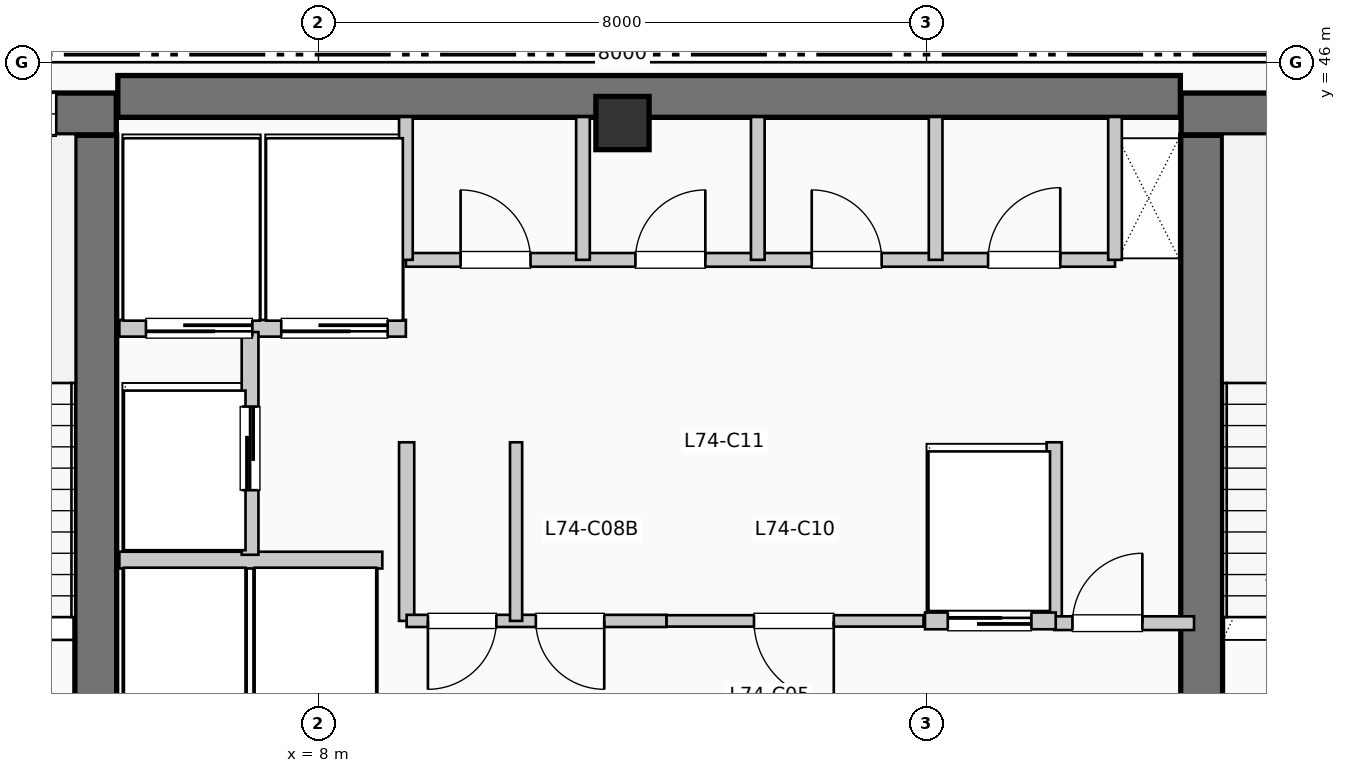
"""IFC4 building model, lengths in metres.
Left out: names, types, materials, properties, quantities, classifications, styles, units other than length and angle.
Written with IfcOpenShell. Run it as: python <this file> out.ifc"""

import sys

from ifc_helpers import new_model, si_unit, direction, frame, frame_2d, origin, origin_2d, place, context, subcontext, project, spatial, rectangle, extrude, element, fill, save


model = new_model("IFC4")
c1 = context("Model", 3, precision=1e-05, world=origin(), true_north=direction((0.0, 1.0)))
c2 = subcontext(c1, "Body", "Model", "MODEL_VIEW")
j1 = project(units=[si_unit("LENGTHUNIT", "METRE"), si_unit("PLANEANGLEUNIT", "RADIAN")], contexts=[c1])
p1 = place(None, origin())
s1 = spatial("IfcSite", under=j1, at=p1, CompositionType="ELEMENT")
p2 = place(p1, origin())
s2 = spatial("IfcBuilding", under=s1, at=p2, CompositionType="ELEMENT")
p3 = place(p2, frame((0.0, 0.0, 303.93)))
s3 = spatial("IfcBuildingStorey", under=s2, at=p3, CompositionType="ELEMENT", Elevation=303.93)
p4 = place(p3, frame((5.36, 45.55, 0.0), z_axis=(0.0, 0.0, 1.0), x_axis=(1.0, 0.0, 0.0)))
e1 = element("IfcWall", 1, at=p4, inside=s3, PredefinedType="SHEAR", context=c2, shape_type="SweptSolid", body=[
    extrude(rectangle(XDim=13.98, YDim=0.55, at=frame_2d((6.99, 0.0))), origin(), (0.0, 0.0, 1.0), 3.96),
])
p5 = place(p3, frame((5.07, 37.15, 0.0), z_axis=(0.0, 0.0, 1.0), x_axis=(0.0, 1.0, 0.0)))
e2 = element("IfcWall", 2, at=p5, inside=s3, PredefinedType="SHEAR", context=c2, shape_type="SweptSolid", body=[
    extrude(rectangle(XDim=7.89, YDim=0.55, at=frame_2d((3.945, 0.0))), origin(), (0.0, 0.0, 1.0), 3.96),
])
p6 = place(p3, frame((1.1, 45.32, 0.0), z_axis=(0.0, 0.0, 1.0), x_axis=(1.0, 0.0, 0.0)))
e3 = element("IfcWall", 3, at=p6, inside=s3, PredefinedType="SHEAR", context=c2, shape_type="SweptSolid", body=[
    extrude(rectangle(XDim=4.24, YDim=0.55, at=frame_2d((2.12, 0.0))), origin(), (0.0, 0.0, 1.0), 3.96),
])
p7 = place(p6, frame((2.05, 0.0, 1.05)))
e4 = element("IfcOpeningElement", 4, at=p7, cuts=e3, PredefinedType="OPENING", context=c2, shape_type="SweptSolid", body=[
    extrude(rectangle(XDim=1.4, YDim=1.8, at=frame_2d((0.7, 0.9))), frame((0.0, 0.285, 0.0), z_axis=(0.0, -1.0, 0.0), x_axis=(1.0, 0.0, 0.0)), (0.0, 0.0, 1.0), 0.57),
])
p8 = place(p3, frame((19.62, 37.15, 0.0), z_axis=(0.0, 0.0, 1.0), x_axis=(0.0, 1.0, 0.0)))
e5 = element("IfcWall", 5, at=p8, inside=s3, PredefinedType="SHEAR", context=c2, shape_type="SweptSolid", body=[
    extrude(rectangle(XDim=7.89, YDim=0.55, at=frame_2d((3.945, 0.0))), origin(), (0.0, 0.0, 1.0), 3.96),
])
p9 = place(p3, frame((19.35, 45.32, 0.0), z_axis=(0.0, 0.0, 1.0), x_axis=(1.0, 0.0, 0.0)))
e6 = element("IfcWall", 6, at=p9, inside=s3, PredefinedType="SHEAR", context=c2, shape_type="SweptSolid", body=[
    extrude(rectangle(XDim=3.69, YDim=0.55, at=frame_2d((1.845, 0.0))), origin(), (0.0, 0.0, 1.0), 3.96),
])
p10 = place(p9, frame((1.15, 0.0, 1.05)))
e7 = element("IfcOpeningElement", 7, at=p10, cuts=e6, PredefinedType="OPENING", context=c2, shape_type="SweptSolid", body=[
    extrude(rectangle(XDim=1.4, YDim=1.8, at=frame_2d((0.7, 0.9))), frame((0.0, 0.285, 0.0), z_axis=(0.0, -1.0, 0.0), x_axis=(1.0, 0.0, 0.0)), (0.0, 0.0, 1.0), 0.57),
])
p11 = place(p3, frame((12.0, 45.2, 0.0), z_axis=(0.0, 0.0, 1.0), x_axis=(1.0, 0.0, 0.0)))
e8 = element("IfcColumn", 8, at=p11, inside=s3, PredefinedType="COLUMN", context=c2, shape_type="SweptSolid", body=[
    extrude(rectangle(XDim=0.7, YDim=0.7, at=origin_2d()), origin(), (0.0, 0.0, 1.0), 3.96),
])
p12 = place(p3, frame((5.38, 39.45, 0.0), z_axis=(0.0, 0.0, 1.0), x_axis=(1.0, 0.0, 0.0)))
e9 = element("IfcWall", 9, at=p12, inside=s3, PredefinedType="PARTITIONING", context=c2, shape_type="SweptSolid", body=[
    extrude(rectangle(XDim=3.46, YDim=0.22, at=frame_2d((1.73, 0.0))), origin(), (0.0, 0.0, 1.0), 3.74),
])
p13 = place(p3, frame((5.38, 42.5, 0.0), z_axis=(0.0, 0.0, 1.0), x_axis=(1.0, 0.0, 0.0)))
e10 = element("IfcWall", 10, at=p13, inside=s3, PredefinedType="PARTITIONING", context=c2, shape_type="SweptSolid", body=[
    extrude(rectangle(XDim=3.77, YDim=0.22, at=frame_2d((1.885, 0.0))), origin(), (0.0, 0.0, 1.0), 3.74),
])
p14 = place(p13, frame((1.75, 0.0, 0.0), z_axis=(0.0, 0.0, 1.0), x_axis=(-1.0, 0.0, 0.0)))
e11 = element("IfcOpeningElement", 11, at=p14, cuts=e10, PredefinedType="OPENING", context=c2, shape_type="SweptSolid", body=[
    extrude(rectangle(XDim=1.4, YDim=2.2, at=frame_2d((0.7, 1.1))), frame((0.0, 0.12, 0.0), z_axis=(0.0, -1.0, 0.0), x_axis=(1.0, 0.0, 0.0)), (0.0, 0.0, 1.0), 0.24),
])
p15 = place(p13, frame((3.53, 0.0, 0.0), z_axis=(0.0, 0.0, 1.0), x_axis=(-1.0, 0.0, 0.0)))
e12 = element("IfcOpeningElement", 12, at=p15, cuts=e10, PredefinedType="OPENING", context=c2, shape_type="SweptSolid", body=[
    extrude(rectangle(XDim=1.4, YDim=2.2, at=frame_2d((0.7, 1.1))), frame((0.0, 0.12, 0.0), z_axis=(0.0, -1.0, 0.0), x_axis=(1.0, 0.0, 0.0)), (0.0, 0.0, 1.0), 0.24),
])
p16 = place(p3, frame((7.1, 39.52, 0.0), z_axis=(0.0, 0.0, 1.0), x_axis=(0.0, 1.0, 0.0)))
e13 = element("IfcWall", 13, at=p16, inside=s3, PredefinedType="PARTITIONING", context=c2, shape_type="SweptSolid", body=[
    extrude(rectangle(XDim=2.93, YDim=0.22, at=frame_2d((1.465, 0.0))), origin(), (0.0, 0.0, 1.0), 3.74),
])
p17 = place(p16, frame((0.85, 0.0, 0.0)))
e14 = element("IfcOpeningElement", 14, at=p17, cuts=e13, PredefinedType="OPENING", context=c2, shape_type="SweptSolid", body=[
    extrude(rectangle(XDim=1.1, YDim=2.2, at=frame_2d((0.55, 1.1))), frame((0.0, 0.12, 0.0), z_axis=(0.0, -1.0, 0.0), x_axis=(1.0, 0.0, 0.0)), (0.0, 0.0, 1.0), 0.24),
])
for number, where, z_axis, x_axis in (
    (15, (9.16, 38.65, 0.0), (0.0, 0.0, 1.0), (0.0, 1.0, 0.0)),
    (16, (17.68, 38.65, 0.0), (0.0, 0.0, 1.0), (0.0, 1.0, 0.0)),
):
    element("IfcWall", number, at=place(p3, frame(where, z_axis=z_axis, x_axis=x_axis)), inside=s3, PredefinedType="PARTITIONING", context=c2, shape_type="SweptSolid", body=[
        extrude(rectangle(XDim=2.35, YDim=0.2, at=frame_2d((1.175, 0.0))), origin(), (0.0, 0.0, 1.0), 3.74),
    ])
p18 = place(p3, frame((17.68, 38.62, 0.0), z_axis=(0.0, 0.0, 1.0), x_axis=(1.0, 0.0, 0.0)))
e17 = element("IfcWall", 17, at=p18, inside=s3, PredefinedType="PARTITIONING", context=c2, shape_type="SweptSolid", body=[
    extrude(rectangle(XDim=1.84, YDim=0.18, at=frame_2d((0.92, 0.0))), origin(), (0.0, 0.0, 1.0), 3.74),
])
p19 = place(p18, frame((0.24, 0.0, 0.0)))
e18 = element("IfcOpeningElement", 18, at=p19, cuts=e17, PredefinedType="OPENING", context=c2, shape_type="SweptSolid", body=[
    extrude(rectangle(XDim=0.92, YDim=2.1, at=frame_2d((0.46, 1.05))), frame((0.0, 0.1, 0.0), z_axis=(0.0, -1.0, 0.0), x_axis=(1.0, 0.0, 0.0)), (0.0, 0.0, 1.0), 0.2),
])
p20 = place(p3, frame((9.16, 38.65, 0.0), z_axis=(0.0, 0.0, 1.0), x_axis=(1.0, 0.0, 0.0)))
e19 = element("IfcWall", 19, at=p20, inside=s3, PredefinedType="PARTITIONING", context=c2, shape_type="SweptSolid", body=[
    extrude(rectangle(XDim=3.42, YDim=0.16, at=frame_2d((1.71, 0.0))), origin(), (0.0, 0.0, 1.0), 3.74),
])
p21 = place(p20, frame((1.18, 0.0, 0.0), z_axis=(0.0, 0.0, 1.0), x_axis=(-1.0, 0.0, 0.0)))
e20 = element("IfcOpeningElement", 20, at=p21, cuts=e19, PredefinedType="OPENING", context=c2, shape_type="SweptSolid", body=[
    extrude(rectangle(XDim=0.9, YDim=2.15, at=frame_2d((0.45, 1.075))), frame((0.0, 0.09, 0.0), z_axis=(0.0, -1.0, 0.0), x_axis=(1.0, 0.0, 0.0)), (0.0, 0.0, 1.0), 0.18),
])
p22 = place(p20, frame((2.6, 0.0, 0.0), z_axis=(0.0, 0.0, 1.0), x_axis=(-1.0, 0.0, 0.0)))
e21 = element("IfcOpeningElement", 21, at=p22, cuts=e19, PredefinedType="OPENING", context=c2, shape_type="SweptSolid", body=[
    extrude(rectangle(XDim=0.9, YDim=2.15, at=frame_2d((0.45, 1.075))), frame((0.0, 0.09, 0.0), z_axis=(0.0, -1.0, 0.0), x_axis=(1.0, 0.0, 0.0)), (0.0, 0.0, 1.0), 0.18),
])
p23 = place(p3, frame((10.6, 38.65, 0.0), z_axis=(0.0, 0.0, 1.0), x_axis=(0.0, 1.0, 0.0)))
e22 = element("IfcWall", 22, at=p23, inside=s3, PredefinedType="PARTITIONING", context=c2, shape_type="SweptSolid", body=[
    extrude(rectangle(XDim=2.35, YDim=0.16, at=frame_2d((1.175, 0.0))), origin(), (0.0, 0.0, 1.0), 3.74),
])
p24 = place(p3, frame((12.58, 38.65, 0.0), z_axis=(0.0, 0.0, 1.0), x_axis=(1.0, 0.0, 0.0)))
e23 = element("IfcWall", 23, at=p24, inside=s3, PredefinedType="PARTITIONING", context=c2, shape_type="SweptSolid", body=[
    extrude(rectangle(XDim=3.38, YDim=0.15, at=frame_2d((1.69, 0.0))), origin(), (0.0, 0.0, 1.0), 3.74),
])
p25 = place(p24, frame((2.2, 0.0, 0.0), z_axis=(0.0, 0.0, 1.0), x_axis=(-1.0, 0.0, 0.0)))
e24 = element("IfcOpeningElement", 24, at=p25, cuts=e23, PredefinedType="OPENING", context=c2, shape_type="SweptSolid", body=[
    extrude(rectangle(XDim=1.05, YDim=2.15, at=frame_2d((0.525, 1.075))), frame((0.0, 0.085, 0.0), z_axis=(0.0, -1.0, 0.0), x_axis=(1.0, 0.0, 0.0)), (0.0, 0.0, 1.0), 0.17),
])
p26 = place(p3, frame((15.98, 38.65, 0.0), z_axis=(0.0, 0.0, 1.0), x_axis=(1.0, 0.0, 0.0)))
e25 = element("IfcWall", 25, at=p26, inside=s3, PredefinedType="PARTITIONING", context=c2, shape_type="SweptSolid", body=[
    extrude(rectangle(XDim=1.72, YDim=0.22, at=frame_2d((0.86, 0.0))), origin(), (0.0, 0.0, 1.0), 3.74),
])
p27 = place(p26, frame((0.3, 0.0, 0.0)))
e26 = element("IfcOpeningElement", 26, at=p27, cuts=e25, PredefinedType="OPENING", context=c2, shape_type="SweptSolid", body=[
    extrude(rectangle(XDim=1.1, YDim=2.2, at=frame_2d((0.55, 1.1))), frame((0.0, 0.12, 0.0), z_axis=(0.0, -1.0, 0.0), x_axis=(1.0, 0.0, 0.0)), (0.0, 0.0, 1.0), 0.24),
])
p28 = place(p3, frame((9.15, 43.4, 0.0), z_axis=(0.0, 0.0, 1.0), x_axis=(1.0, 0.0, 0.0)))
e27 = element("IfcWall", 27, at=p28, inside=s3, PredefinedType="PLUMBINGWALL", context=c2, shape_type="SweptSolid", body=[
    extrude(rectangle(XDim=9.33, YDim=0.18, at=frame_2d((4.665, 0.0))), origin(), (0.0, 0.0, 1.0), 3.74),
])
p29 = place(p28, frame((0.72, 0.0, 0.0)))
e28 = element("IfcOpeningElement", 28, at=p29, cuts=e27, PredefinedType="OPENING", context=c2, shape_type="SweptSolid", body=[
    extrude(rectangle(XDim=0.92, YDim=2.1, at=frame_2d((0.46, 1.05))), frame((0.0, 0.1, 0.0), z_axis=(0.0, -1.0, 0.0), x_axis=(1.0, 0.0, 0.0)), (0.0, 0.0, 1.0), 0.2),
])
p30 = place(p28, frame((3.02, 0.0, 0.0)))
e29 = element("IfcOpeningElement", 29, at=p30, cuts=e27, PredefinedType="OPENING", context=c2, shape_type="SweptSolid", body=[
    extrude(rectangle(XDim=0.92, YDim=2.1, at=frame_2d((0.46, 1.05))), frame((0.0, 0.1, 0.0), z_axis=(0.0, -1.0, 0.0), x_axis=(1.0, 0.0, 0.0)), (0.0, 0.0, 1.0), 0.2),
])
p31 = place(p28, frame((5.34, 0.0, 0.0)))
e30 = element("IfcOpeningElement", 30, at=p31, cuts=e27, PredefinedType="OPENING", context=c2, shape_type="SweptSolid", body=[
    extrude(rectangle(XDim=0.92, YDim=2.1, at=frame_2d((0.46, 1.05))), frame((0.0, 0.1, 0.0), z_axis=(0.0, -1.0, 0.0), x_axis=(1.0, 0.0, 0.0)), (0.0, 0.0, 1.0), 0.2),
])
p32 = place(p28, frame((7.66, 0.0, 0.0)))
e31 = element("IfcOpeningElement", 31, at=p32, cuts=e27, PredefinedType="OPENING", context=c2, shape_type="SweptSolid", body=[
    extrude(rectangle(XDim=0.95, YDim=2.1, at=frame_2d((0.475, 1.05))), frame((0.0, 0.1, 0.0), z_axis=(0.0, -1.0, 0.0), x_axis=(1.0, 0.0, 0.0)), (0.0, 0.0, 1.0), 0.2),
])
for number, where, z_axis, x_axis in (
    (32, (9.15, 43.4, 0.0), (0.0, 0.0, 1.0), (0.0, 1.0, 0.0)),
    (33, (18.48, 43.4, 0.0), (0.0, 0.0, 1.0), (0.0, 1.0, 0.0)),
    (34, (11.48, 43.4, 0.0), (0.0, 0.0, 1.0), (0.0, 1.0, 0.0)),
    (35, (13.78, 43.4, 0.0), (0.0, 0.0, 1.0), (0.0, 1.0, 0.0)),
    (36, (16.12, 43.4, 0.0), (0.0, 0.0, 1.0), (0.0, 1.0, 0.0)),
):
    element("IfcWall", number, at=place(p3, frame(where, z_axis=z_axis, x_axis=x_axis)), inside=s3, PredefinedType="PLUMBINGWALL", context=c2, shape_type="SweptSolid", body=[
        extrude(rectangle(XDim=1.88, YDim=0.18, at=frame_2d((0.94, 0.0))), origin(), (0.0, 0.0, 1.0), 3.74),
    ])
p33 = place(p7, origin())
e37 = element("IfcWindow", 37, at=p33, inside=s3, PartitioningType="SINGLE_PANEL", PredefinedType="WINDOW", context=c2, shape_type="SweptSolid", body=[
    extrude(rectangle(XDim=1.4, YDim=1.8, at=frame_2d((0.7, 0.9))), frame((0.0, 0.03, 0.0), z_axis=(0.0, -1.0, 0.0), x_axis=(1.0, 0.0, 0.0)), (0.0, 0.0, 1.0), 0.06),
])
fill(e4, e37)
p34 = place(p14, origin())
e38 = element("IfcDoor", 38, at=p34, inside=s3, OperationType="SLIDING_TO_LEFT", PredefinedType="DOOR", context=c2, shape_type="SweptSolid", body=[
    extrude(rectangle(XDim=1.4, YDim=2.2, at=frame_2d((0.7, 1.1))), frame((0.0, 0.025, 0.0), z_axis=(0.0, -1.0, 0.0), x_axis=(1.0, 0.0, 0.0)), (0.0, 0.0, 1.0), 0.05),
])
fill(e11, e38)
p35 = place(p15, origin())
e39 = element("IfcDoor", 39, at=p35, inside=s3, OperationType="SLIDING_TO_LEFT", PredefinedType="DOOR", context=c2, shape_type="SweptSolid", body=[
    extrude(rectangle(XDim=1.4, YDim=2.2, at=frame_2d((0.7, 1.1))), frame((0.0, 0.025, 0.0), z_axis=(0.0, -1.0, 0.0), x_axis=(1.0, 0.0, 0.0)), (0.0, 0.0, 1.0), 0.05),
])
fill(e12, e39)
p36 = place(p17, origin())
e40 = element("IfcDoor", 40, at=p36, inside=s3, OperationType="SLIDING_TO_LEFT", PredefinedType="DOOR", context=c2, shape_type="SweptSolid", body=[
    extrude(rectangle(XDim=1.1, YDim=2.2, at=frame_2d((0.55, 1.1))), frame((0.0, 0.025, 0.0), z_axis=(0.0, -1.0, 0.0), x_axis=(1.0, 0.0, 0.0)), (0.0, 0.0, 1.0), 0.05),
])
fill(e14, e40)
p37 = place(p19, origin())
e41 = element("IfcDoor", 41, at=p37, inside=s3, OperationType="SINGLE_SWING_RIGHT", PredefinedType="DOOR", context=c2, shape_type="SweptSolid", body=[
    extrude(rectangle(XDim=0.92, YDim=2.1, at=frame_2d((0.46, 1.05))), frame((0.0, 0.025, 0.0), z_axis=(0.0, -1.0, 0.0), x_axis=(1.0, 0.0, 0.0)), (0.0, 0.0, 1.0), 0.05),
])
fill(e18, e41)
p38 = place(p21, origin())
e42 = element("IfcDoor", 42, at=p38, inside=s3, OperationType="SINGLE_SWING_LEFT", PredefinedType="DOOR", context=c2, shape_type="SweptSolid", body=[
    extrude(rectangle(XDim=0.9, YDim=2.15, at=frame_2d((0.45, 1.075))), frame((0.0, 0.025, 0.0), z_axis=(0.0, -1.0, 0.0), x_axis=(1.0, 0.0, 0.0)), (0.0, 0.0, 1.0), 0.05),
])
fill(e20, e42)
p39 = place(p22, origin())
e43 = element("IfcDoor", 43, at=p39, inside=s3, OperationType="SINGLE_SWING_RIGHT", PredefinedType="DOOR", context=c2, shape_type="SweptSolid", body=[
    extrude(rectangle(XDim=0.9, YDim=2.15, at=frame_2d((0.45, 1.075))), frame((0.0, 0.025, 0.0), z_axis=(0.0, -1.0, 0.0), x_axis=(1.0, 0.0, 0.0)), (0.0, 0.0, 1.0), 0.05),
])
fill(e21, e43)
p40 = place(p25, origin())
e44 = element("IfcDoor", 44, at=p40, inside=s3, OperationType="SINGLE_SWING_RIGHT", PredefinedType="DOOR", context=c2, shape_type="SweptSolid", body=[
    extrude(rectangle(XDim=1.05, YDim=2.15, at=frame_2d((0.525, 1.075))), frame((0.0, 0.025, 0.0), z_axis=(0.0, -1.0, 0.0), x_axis=(1.0, 0.0, 0.0)), (0.0, 0.0, 1.0), 0.05),
])
fill(e24, e44)
p41 = place(p27, origin())
e45 = element("IfcDoor", 45, at=p41, inside=s3, OperationType="SLIDING_TO_LEFT", PredefinedType="DOOR", context=c2, shape_type="SweptSolid", body=[
    extrude(rectangle(XDim=1.1, YDim=2.2, at=frame_2d((0.55, 1.1))), frame((0.0, 0.025, 0.0), z_axis=(0.0, -1.0, 0.0), x_axis=(1.0, 0.0, 0.0)), (0.0, 0.0, 1.0), 0.05),
])
fill(e26, e45)
p42 = place(p29, origin())
e46 = element("IfcDoor", 46, at=p42, inside=s3, OperationType="SINGLE_SWING_LEFT", PredefinedType="DOOR", context=c2, shape_type="SweptSolid", body=[
    extrude(rectangle(XDim=0.92, YDim=2.1, at=frame_2d((0.46, 1.05))), frame((0.0, 0.025, 0.0), z_axis=(0.0, -1.0, 0.0), x_axis=(1.0, 0.0, 0.0)), (0.0, 0.0, 1.0), 0.05),
])
fill(e28, e46)
p43 = place(p30, origin())
e47 = element("IfcDoor", 47, at=p43, inside=s3, OperationType="SINGLE_SWING_RIGHT", PredefinedType="DOOR", context=c2, shape_type="SweptSolid", body=[
    extrude(rectangle(XDim=0.92, YDim=2.1, at=frame_2d((0.46, 1.05))), frame((0.0, 0.025, 0.0), z_axis=(0.0, -1.0, 0.0), x_axis=(1.0, 0.0, 0.0)), (0.0, 0.0, 1.0), 0.05),
])
fill(e29, e47)
p44 = place(p31, origin())
e48 = element("IfcDoor", 48, at=p44, inside=s3, OperationType="SINGLE_SWING_LEFT", PredefinedType="DOOR", context=c2, shape_type="SweptSolid", body=[
    extrude(rectangle(XDim=0.92, YDim=2.1, at=frame_2d((0.46, 1.05))), frame((0.0, 0.025, 0.0), z_axis=(0.0, -1.0, 0.0), x_axis=(1.0, 0.0, 0.0)), (0.0, 0.0, 1.0), 0.05),
])
fill(e30, e48)
p45 = place(p32, origin())
e49 = element("IfcDoor", 49, at=p45, inside=s3, OperationType="SINGLE_SWING_RIGHT", PredefinedType="DOOR", context=c2, shape_type="SweptSolid", body=[
    extrude(rectangle(XDim=0.95, YDim=2.1, at=frame_2d((0.475, 1.05))), frame((0.0, 0.025, 0.0), z_axis=(0.0, -1.0, 0.0), x_axis=(1.0, 0.0, 0.0)), (0.0, 0.0, 1.0), 0.05),
])
fill(e31, e49)
save(model, sys.argv[1])
